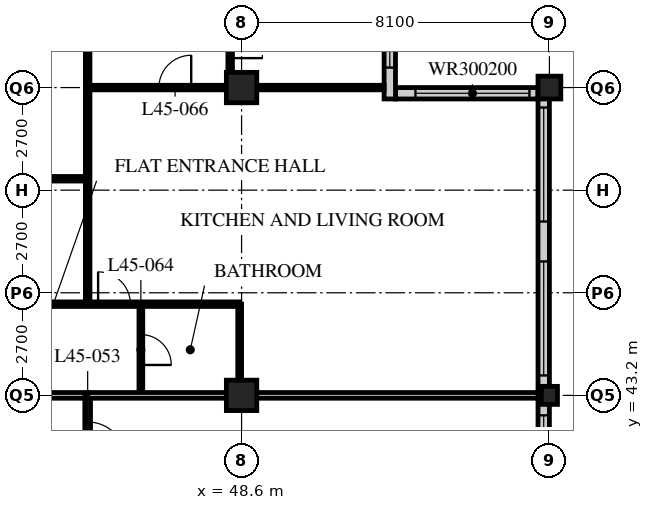
"""IFC4 building model, lengths in metres.
Left out: names, types, materials, properties, quantities, classifications, styles, units other than length and angle.
Written with IfcOpenShell. Run it as: python <this file> out.ifc"""

import sys

from ifc_helpers import new_model, si_unit, direction, frame, frame_2d, origin, origin_2d, place, context, subcontext, project, spatial, rectangle, hollow_rectangle, i_section, extrude, element, fill, save


model = new_model("IFC4")
c1 = context("Model", 3, precision=1e-05, world=origin(), true_north=direction((0.0, 1.0)))
c2 = subcontext(c1, "Body", "Model", "MODEL_VIEW")
j1 = project(units=[si_unit("LENGTHUNIT", "METRE"), si_unit("PLANEANGLEUNIT", "RADIAN")], contexts=[c1])
p1 = place(None, origin())
s1 = spatial("IfcSite", under=j1, at=p1, CompositionType="ELEMENT")
p2 = place(p1, origin())
s2 = spatial("IfcBuilding", under=s1, at=p2, CompositionType="ELEMENT")
p3 = place(p2, frame((0.0, 0.0, 177.6)))
s3 = spatial("IfcBuildingStorey", under=s2, at=p3, CompositionType="ELEMENT", Elevation=177.6)
for number, where, z_axis, x_axis in (
    (1, (48.6, 43.2, 0.0), (0.0, 0.0, 1.0), (1.0, 0.0, 0.0)),
    (2, (48.6, 51.3, 0.0), (0.0, 0.0, 1.0), (1.0, 0.0, 0.0)),
):
    element("IfcColumn", number, at=place(p3, frame(where, z_axis=z_axis, x_axis=x_axis)), inside=s3, PredefinedType="COLUMN", context=c2, shape_type="SweptSolid", body=[
        extrude(hollow_rectangle(XDim=0.8, YDim=0.8, WallThickness=0.08, at=origin_2d()), origin(), (0.0, 0.0, 1.0), 3.6),
    ])
p4 = place(p3, frame((56.7, 43.2, 0.0), z_axis=(0.0, 0.0, 1.0), x_axis=(1.0, 0.0, 0.0)))
e3 = element("IfcColumn", 3, at=p4, inside=s3, PredefinedType="COLUMN", context=c2, shape_type="SweptSolid", body=[
    extrude(i_section(OverallWidth=0.424, OverallDepth=0.475, WebThickness=0.048, FlangeThickness=0.077, FilletRadius=0.015, at=origin_2d()), origin(), (0.0, 0.0, 1.0), 3.6),
])
p5 = place(p3, frame((56.7, 51.3, 0.0), z_axis=(0.0, 0.0, 1.0), x_axis=(1.0, 0.0, 0.0)))
e4 = element("IfcColumn", 4, at=p5, inside=s3, PredefinedType="COLUMN", context=c2, shape_type="SweptSolid", body=[
    extrude(hollow_rectangle(XDim=0.6, YDim=0.6, WallThickness=0.05, at=origin_2d()), origin(), (0.0, 0.0, 1.0), 3.6),
])
p6 = place(p3, frame((56.55, 19.2, 0.0), z_axis=(0.0, 0.0, 1.0), x_axis=(0.0, 1.0, 0.0)))
e5 = element("IfcWall", 5, at=p6, inside=s3, PredefinedType="SOLIDWALL", context=c2, shape_type="SweptSolid", body=[
    extrude(rectangle(XDim=32.1, YDim=0.3, at=frame_2d((16.05, 0.0))), origin(), (0.0, 0.0, 1.0), 3.39),
])
p7 = place(p6, frame((0.225, 0.0, 0.6)))
e6 = element("IfcOpeningElement", 6, at=p7, cuts=e5, PredefinedType="OPENING", context=c2, shape_type="SweptSolid", body=[
    extrude(rectangle(XDim=3.0, YDim=2.4, at=frame_2d((1.5, 1.2))), frame((0.0, 0.16, 0.0), z_axis=(0.0, -1.0, 0.0), x_axis=(1.0, 0.0, 0.0)), (0.0, 0.0, 1.0), 0.32),
])
p8 = place(p6, frame((4.275, 0.0, 0.6)))
e7 = element("IfcOpeningElement", 7, at=p8, cuts=e5, PredefinedType="OPENING", context=c2, shape_type="SweptSolid", body=[
    extrude(rectangle(XDim=3.0, YDim=2.4, at=frame_2d((1.5, 1.2))), frame((0.0, 0.16, 0.0), z_axis=(0.0, -1.0, 0.0), x_axis=(1.0, 0.0, 0.0)), (0.0, 0.0, 1.0), 0.32),
])
p9 = place(p6, frame((8.325, 0.0, 0.6)))
e8 = element("IfcOpeningElement", 8, at=p9, cuts=e5, PredefinedType="OPENING", context=c2, shape_type="SweptSolid", body=[
    extrude(rectangle(XDim=3.0, YDim=2.4, at=frame_2d((1.5, 1.2))), frame((0.0, 0.16, 0.0), z_axis=(0.0, -1.0, 0.0), x_axis=(1.0, 0.0, 0.0)), (0.0, 0.0, 1.0), 0.32),
])
p10 = place(p6, frame((12.375, 0.0, 0.6)))
e9 = element("IfcOpeningElement", 9, at=p10, cuts=e5, PredefinedType="OPENING", context=c2, shape_type="SweptSolid", body=[
    extrude(rectangle(XDim=3.0, YDim=2.4, at=frame_2d((1.5, 1.2))), frame((0.0, 0.16, 0.0), z_axis=(0.0, -1.0, 0.0), x_axis=(1.0, 0.0, 0.0)), (0.0, 0.0, 1.0), 0.32),
])
p11 = place(p6, frame((16.425, 0.0, 0.6)))
e10 = element("IfcOpeningElement", 10, at=p11, cuts=e5, PredefinedType="OPENING", context=c2, shape_type="SweptSolid", body=[
    extrude(rectangle(XDim=3.0, YDim=2.4, at=frame_2d((1.5, 1.2))), frame((0.0, 0.16, 0.0), z_axis=(0.0, -1.0, 0.0), x_axis=(1.0, 0.0, 0.0)), (0.0, 0.0, 1.0), 0.32),
])
p12 = place(p6, frame((20.475, 0.0, 0.6)))
e11 = element("IfcOpeningElement", 11, at=p12, cuts=e5, PredefinedType="OPENING", context=c2, shape_type="SweptSolid", body=[
    extrude(rectangle(XDim=3.0, YDim=2.4, at=frame_2d((1.5, 1.2))), frame((0.0, 0.16, 0.0), z_axis=(0.0, -1.0, 0.0), x_axis=(1.0, 0.0, 0.0)), (0.0, 0.0, 1.0), 0.32),
])
p13 = place(p6, frame((24.525, 0.0, 0.6)))
e12 = element("IfcOpeningElement", 12, at=p13, cuts=e5, PredefinedType="OPENING", context=c2, shape_type="SweptSolid", body=[
    extrude(rectangle(XDim=3.0, YDim=2.4, at=frame_2d((1.5, 1.2))), frame((0.0, 0.16, 0.0), z_axis=(0.0, -1.0, 0.0), x_axis=(1.0, 0.0, 0.0)), (0.0, 0.0, 1.0), 0.32),
])
p14 = place(p6, frame((28.575, 0.0, 0.6)))
e13 = element("IfcOpeningElement", 13, at=p14, cuts=e5, PredefinedType="OPENING", context=c2, shape_type="SweptSolid", body=[
    extrude(rectangle(XDim=3.0, YDim=2.4, at=frame_2d((1.5, 1.2))), frame((0.0, 0.16, 0.0), z_axis=(0.0, -1.0, 0.0), x_axis=(1.0, 0.0, 0.0)), (0.0, 0.0, 1.0), 0.32),
])
p15 = place(p3, frame((56.4, 51.15, 0.0), z_axis=(0.0, 0.0, 1.0), x_axis=(-1.0, 0.0, 0.0)))
e14 = element("IfcWall", 14, at=p15, inside=s3, PredefinedType="SOLIDWALL", context=c2, shape_type="SweptSolid", body=[
    extrude(rectangle(XDim=3.75, YDim=0.3, at=frame_2d((1.875, 0.0))), origin(), (0.0, 0.0, 1.0), 3.39),
])
p16 = place(p15, frame((0.225, 0.0, 0.6)))
e15 = element("IfcOpeningElement", 15, at=p16, cuts=e14, PredefinedType="OPENING", context=c2, shape_type="SweptSolid", body=[
    extrude(rectangle(XDim=3.0, YDim=2.0, at=frame_2d((1.5, 1.0))), frame((0.0, 0.16, 0.0), z_axis=(0.0, -1.0, 0.0), x_axis=(1.0, 0.0, 0.0)), (0.0, 0.0, 1.0), 0.32),
])
p17 = place(p3, frame((52.5, 51.0, 0.0), z_axis=(0.0, 0.0, 1.0), x_axis=(0.0, 1.0, 0.0)))
e16 = element("IfcWall", 16, at=p17, inside=s3, PredefinedType="SOLIDWALL", context=c2, shape_type="SweptSolid", body=[
    extrude(rectangle(XDim=4.35, YDim=0.3, at=frame_2d((2.175, 0.0))), origin(), (0.0, 0.0, 1.0), 3.39),
])
p18 = place(p17, frame((0.825, 0.0, 0.6)))
e17 = element("IfcOpeningElement", 17, at=p18, cuts=e16, PredefinedType="OPENING", context=c2, shape_type="SweptSolid", body=[
    extrude(rectangle(XDim=3.0, YDim=2.0, at=frame_2d((1.5, 1.0))), frame((0.0, 0.16, 0.0), z_axis=(0.0, -1.0, 0.0), x_axis=(1.0, 0.0, 0.0)), (0.0, 0.0, 1.0), 0.32),
])
p19 = place(p3, frame((12.15, 43.2, 0.0), z_axis=(0.0, 0.0, 1.0), x_axis=(1.0, 0.0, 0.0)))
e18 = element("IfcWall", 18, at=p19, inside=s3, PredefinedType="PARTITIONING", context=c2, shape_type="SweptSolid", body=[
    extrude(rectangle(XDim=32.4, YDim=0.15, at=frame_2d((16.2, 0.0))), origin(), (0.0, 0.0, 1.0), 2.778),
])
p20 = place(p19, frame((4.95, 0.0, 0.0)))
e19 = element("IfcOpeningElement", 19, at=p20, cuts=e18, PredefinedType="OPENING", context=c2, shape_type="SweptSolid", body=[
    extrude(rectangle(XDim=1.0, YDim=2.1, at=frame_2d((0.5, 1.05))), frame((0.0, 0.085, 0.0), z_axis=(0.0, -1.0, 0.0), x_axis=(1.0, 0.0, 0.0)), (0.0, 0.0, 1.0), 0.17),
])
p21 = place(p19, frame((13.05, 0.0, 0.0)))
e20 = element("IfcOpeningElement", 20, at=p21, cuts=e18, PredefinedType="OPENING", context=c2, shape_type="SweptSolid", body=[
    extrude(rectangle(XDim=1.0, YDim=2.1, at=frame_2d((0.5, 1.05))), frame((0.0, 0.085, 0.0), z_axis=(0.0, -1.0, 0.0), x_axis=(1.0, 0.0, 0.0)), (0.0, 0.0, 1.0), 0.17),
])
p22 = place(p19, frame((21.15, 0.0, 0.0)))
e21 = element("IfcOpeningElement", 21, at=p22, cuts=e18, PredefinedType="OPENING", context=c2, shape_type="SweptSolid", body=[
    extrude(rectangle(XDim=1.0, YDim=2.1, at=frame_2d((0.5, 1.05))), frame((0.0, 0.085, 0.0), z_axis=(0.0, -1.0, 0.0), x_axis=(1.0, 0.0, 0.0)), (0.0, 0.0, 1.0), 0.17),
])
p23 = place(p19, frame((29.875, 0.0, 0.0)))
e22 = element("IfcOpeningElement", 22, at=p23, cuts=e18, PredefinedType="OPENING", context=c2, shape_type="SweptSolid", body=[
    extrude(rectangle(XDim=1.0, YDim=2.1, at=frame_2d((0.5, 1.05))), frame((0.0, 0.085, 0.0), z_axis=(0.0, -1.0, 0.0), x_axis=(1.0, 0.0, 0.0)), (0.0, 0.0, 1.0), 0.17),
])
p24 = place(p19, frame((1.525, 0.0, 0.0)))
e23 = element("IfcOpeningElement", 23, at=p24, cuts=e18, PredefinedType="OPENING", context=c2, shape_type="SweptSolid", body=[
    extrude(rectangle(XDim=1.0, YDim=2.1, at=frame_2d((0.5, 1.05))), frame((0.0, 0.085, 0.0), z_axis=(0.0, -1.0, 0.0), x_axis=(1.0, 0.0, 0.0)), (0.0, 0.0, 1.0), 0.17),
])
p25 = place(p3, frame((44.55, 18.9, 0.0), z_axis=(0.0, 0.0, 1.0), x_axis=(0.0, 1.0, 0.0)))
e24 = element("IfcWall", 24, at=p25, inside=s3, PredefinedType="PARTITIONING", context=c2, shape_type="SweptSolid", body=[
    extrude(rectangle(XDim=24.3, YDim=0.15, at=frame_2d((12.15, 0.0))), origin(), (0.0, 0.0, 1.0), 3.39),
])
p26 = place(p25, frame((2.35, 0.0, 0.0)))
e25 = element("IfcOpeningElement", 25, at=p26, cuts=e24, PredefinedType="OPENING", context=c2, shape_type="SweptSolid", body=[
    extrude(rectangle(XDim=1.0, YDim=2.1, at=frame_2d((0.5, 1.05))), frame((0.0, 0.085, 0.0), z_axis=(0.0, -1.0, 0.0), x_axis=(1.0, 0.0, 0.0)), (0.0, 0.0, 1.0), 0.17),
])
p27 = place(p25, frame((4.45, 0.0, 0.0)))
e26 = element("IfcOpeningElement", 26, at=p27, cuts=e24, PredefinedType="OPENING", context=c2, shape_type="SweptSolid", body=[
    extrude(rectangle(XDim=1.0, YDim=2.1, at=frame_2d((0.5, 1.05))), frame((0.0, 0.085, 0.0), z_axis=(0.0, -1.0, 0.0), x_axis=(1.0, 0.0, 0.0)), (0.0, 0.0, 1.0), 0.17),
])
p28 = place(p25, frame((18.55, 0.0, 0.0)))
e27 = element("IfcOpeningElement", 27, at=p28, cuts=e24, PredefinedType="OPENING", context=c2, shape_type="SweptSolid", body=[
    extrude(rectangle(XDim=1.0, YDim=2.1, at=frame_2d((0.5, 1.05))), frame((0.0, 0.085, 0.0), z_axis=(0.0, -1.0, 0.0), x_axis=(1.0, 0.0, 0.0)), (0.0, 0.0, 1.0), 0.17),
])
p29 = place(p25, frame((22.6, 0.0, 0.0)))
e28 = element("IfcOpeningElement", 28, at=p29, cuts=e24, PredefinedType="OPENING", context=c2, shape_type="SweptSolid", body=[
    extrude(rectangle(XDim=1.0, YDim=2.1, at=frame_2d((0.5, 1.05))), frame((0.0, 0.085, 0.0), z_axis=(0.0, -1.0, 0.0), x_axis=(1.0, 0.0, 0.0)), (0.0, 0.0, 1.0), 0.17),
])
p30 = place(p3, frame((45.95, 43.2, 0.0), z_axis=(0.0, 0.0, 1.0), x_axis=(0.0, 1.0, 0.0)))
e29 = element("IfcWall", 29, at=p30, inside=s3, PredefinedType="PARTITIONING", context=c2, shape_type="SweptSolid", body=[
    extrude(rectangle(XDim=2.4, YDim=0.1, at=frame_2d((1.2, 0.0))), origin(), (0.0, 0.0, 1.0), 3.39),
])
p31 = place(p30, frame((0.8, 0.0, 0.0)))
e30 = element("IfcOpeningElement", 30, at=p31, cuts=e29, PredefinedType="OPENING", context=c2, shape_type="SweptSolid", body=[
    extrude(rectangle(XDim=0.8, YDim=2.1, at=frame_2d((0.4, 1.05))), frame((0.0, 0.06, 0.0), z_axis=(0.0, -1.0, 0.0), x_axis=(1.0, 0.0, 0.0)), (0.0, 0.0, 1.0), 0.12),
])
p32 = place(p3, frame((48.55, 43.2, 0.0), z_axis=(0.0, 0.0, 1.0), x_axis=(0.0, 1.0, 0.0)))
e31 = element("IfcWall", 31, at=p32, inside=s3, PredefinedType="PARTITIONING", context=c2, shape_type="SweptSolid", body=[
    extrude(rectangle(XDim=2.4, YDim=0.1, at=frame_2d((1.2, 0.0))), origin(), (0.0, 0.0, 1.0), 2.778),
])
p33 = place(p3, frame((44.55, 45.6, 0.0), z_axis=(0.0, 0.0, 1.0), x_axis=(0.0, 1.0, 0.0)))
e32 = element("IfcWall", 32, at=p33, inside=s3, PredefinedType="PARTITIONING", context=c2, shape_type="SweptSolid", body=[
    extrude(rectangle(XDim=13.5, YDim=0.12, at=frame_2d((6.75, 0.0))), origin(), (0.0, 0.0, 1.0), 3.39),
])
p34 = place(p3, frame((44.55, 51.3, 0.0), z_axis=(0.0, 0.0, 1.0), x_axis=(1.0, 0.0, 0.0)))
e33 = element("IfcWall", 33, at=p34, inside=s3, PredefinedType="PARTITIONING", context=c2, shape_type="SweptSolid", body=[
    extrude(rectangle(XDim=7.8, YDim=0.12, at=frame_2d((3.9, 0.0))), origin(), (0.0, 0.0, 1.0), 2.778),
])
p35 = place(p34, frame((1.875, 0.0, 0.0)))
e34 = element("IfcOpeningElement", 34, at=p35, cuts=e33, PredefinedType="OPENING", context=c2, shape_type="SweptSolid", body=[
    extrude(rectangle(XDim=0.85, YDim=2.1, at=frame_2d((0.425, 1.05))), frame((0.0, 0.07, 0.0), z_axis=(0.0, -1.0, 0.0), x_axis=(1.0, 0.0, 0.0)), (0.0, 0.0, 1.0), 0.14),
])
p36 = place(p3, frame((44.55, 43.2, 0.0), z_axis=(0.0, 0.0, 1.0), x_axis=(1.0, 0.0, 0.0)))
e35 = element("IfcWall", 35, at=p36, inside=s3, PredefinedType="PARTITIONING", context=c2, shape_type="SweptSolid", body=[
    extrude(rectangle(XDim=11.85, YDim=0.15, at=frame_2d((5.925, 0.0))), origin(), (0.0, 0.0, 1.0), 2.778),
])
p37 = place(p3, frame((8.15, 45.6, 0.0), z_axis=(0.0, 0.0, 1.0), x_axis=(1.0, 0.0, 0.0)))
e36 = element("IfcWall", 36, at=p37, inside=s3, PredefinedType="PARTITIONING", context=c2, shape_type="SweptSolid", body=[
    extrude(rectangle(XDim=40.4, YDim=0.12, at=frame_2d((20.2, 0.0))), origin(), (0.0, 0.0, 1.0), 3.39),
])
p38 = place(p37, frame((9.025, 0.0, 0.0)))
e37 = element("IfcOpeningElement", 37, at=p38, cuts=e36, PredefinedType="OPENING", context=c2, shape_type="SweptSolid", body=[
    extrude(rectangle(XDim=0.85, YDim=2.1, at=frame_2d((0.425, 1.05))), frame((0.0, 0.07, 0.0), z_axis=(0.0, -1.0, 0.0), x_axis=(1.0, 0.0, 0.0)), (0.0, 0.0, 1.0), 0.14),
])
p39 = place(p37, frame((12.425, 0.0, 0.0)))
e38 = element("IfcOpeningElement", 38, at=p39, cuts=e36, PredefinedType="OPENING", context=c2, shape_type="SweptSolid", body=[
    extrude(rectangle(XDim=0.85, YDim=2.1, at=frame_2d((0.425, 1.05))), frame((0.0, 0.07, 0.0), z_axis=(0.0, -1.0, 0.0), x_axis=(1.0, 0.0, 0.0)), (0.0, 0.0, 1.0), 0.14),
])
p40 = place(p37, frame((17.125, 0.0, 0.0)))
e39 = element("IfcOpeningElement", 39, at=p40, cuts=e36, PredefinedType="OPENING", context=c2, shape_type="SweptSolid", body=[
    extrude(rectangle(XDim=0.85, YDim=2.1, at=frame_2d((0.425, 1.05))), frame((0.0, 0.07, 0.0), z_axis=(0.0, -1.0, 0.0), x_axis=(1.0, 0.0, 0.0)), (0.0, 0.0, 1.0), 0.14),
])
p41 = place(p37, frame((20.525, 0.0, 0.0)))
e40 = element("IfcOpeningElement", 40, at=p41, cuts=e36, PredefinedType="OPENING", context=c2, shape_type="SweptSolid", body=[
    extrude(rectangle(XDim=0.85, YDim=2.1, at=frame_2d((0.425, 1.05))), frame((0.0, 0.07, 0.0), z_axis=(0.0, -1.0, 0.0), x_axis=(1.0, 0.0, 0.0)), (0.0, 0.0, 1.0), 0.14),
])
p42 = place(p37, frame((25.225, 0.0, 0.0)))
e41 = element("IfcOpeningElement", 41, at=p42, cuts=e36, PredefinedType="OPENING", context=c2, shape_type="SweptSolid", body=[
    extrude(rectangle(XDim=0.85, YDim=2.1, at=frame_2d((0.425, 1.05))), frame((0.0, 0.07, 0.0), z_axis=(0.0, -1.0, 0.0), x_axis=(1.0, 0.0, 0.0)), (0.0, 0.0, 1.0), 0.14),
])
p43 = place(p37, frame((28.625, 0.0, 0.0)))
e42 = element("IfcOpeningElement", 42, at=p43, cuts=e36, PredefinedType="OPENING", context=c2, shape_type="SweptSolid", body=[
    extrude(rectangle(XDim=0.85, YDim=2.1, at=frame_2d((0.425, 1.05))), frame((0.0, 0.07, 0.0), z_axis=(0.0, -1.0, 0.0), x_axis=(1.0, 0.0, 0.0)), (0.0, 0.0, 1.0), 0.14),
])
p44 = place(p37, frame((32.825, 0.0, 0.0)))
e43 = element("IfcOpeningElement", 43, at=p44, cuts=e36, PredefinedType="OPENING", context=c2, shape_type="SweptSolid", body=[
    extrude(rectangle(XDim=0.85, YDim=2.1, at=frame_2d((0.425, 1.05))), frame((0.0, 0.07, 0.0), z_axis=(0.0, -1.0, 0.0), x_axis=(1.0, 0.0, 0.0)), (0.0, 0.0, 1.0), 0.14),
])
p45 = place(p37, frame((36.675, 0.0, 0.0)))
e44 = element("IfcOpeningElement", 44, at=p45, cuts=e36, PredefinedType="OPENING", context=c2, shape_type="SweptSolid", body=[
    extrude(rectangle(XDim=0.85, YDim=2.1, at=frame_2d((0.425, 1.05))), frame((0.0, 0.07, 0.0), z_axis=(0.0, -1.0, 0.0), x_axis=(1.0, 0.0, 0.0)), (0.0, 0.0, 1.0), 0.14),
])
p46 = place(p37, frame((6.725, 0.0, 0.0)))
e45 = element("IfcOpeningElement", 45, at=p46, cuts=e36, PredefinedType="OPENING", context=c2, shape_type="SweptSolid", body=[
    extrude(rectangle(XDim=0.85, YDim=2.1, at=frame_2d((0.425, 1.05))), frame((0.0, 0.07, 0.0), z_axis=(0.0, -1.0, 0.0), x_axis=(1.0, 0.0, 0.0)), (0.0, 0.0, 1.0), 0.14),
])
p47 = place(p37, frame((2.875, 0.0, 0.0)))
e46 = element("IfcOpeningElement", 46, at=p47, cuts=e36, PredefinedType="OPENING", context=c2, shape_type="SweptSolid", body=[
    extrude(rectangle(XDim=0.85, YDim=2.1, at=frame_2d((0.425, 1.05))), frame((0.0, 0.07, 0.0), z_axis=(0.0, -1.0, 0.0), x_axis=(1.0, 0.0, 0.0)), (0.0, 0.0, 1.0), 0.14),
])
p48 = place(p3, frame((48.3, 51.3, 0.0), z_axis=(0.0, 0.0, 1.0), x_axis=(0.0, 1.0, 0.0)))
e47 = element("IfcWall", 47, at=p48, inside=s3, PredefinedType="PARTITIONING", context=c2, shape_type="SweptSolid", body=[
    extrude(rectangle(XDim=3.75, YDim=0.12, at=frame_2d((1.875, 0.0))), origin(), (0.0, 0.0, 1.0), 3.39),
])
p49 = place(p48, frame((0.775, 0.0, 0.0)))
e48 = element("IfcOpeningElement", 48, at=p49, cuts=e47, PredefinedType="OPENING", context=c2, shape_type="SweptSolid", body=[
    extrude(rectangle(XDim=0.85, YDim=2.1, at=frame_2d((0.425, 1.05))), frame((0.0, 0.07, 0.0), z_axis=(0.0, -1.0, 0.0), x_axis=(1.0, 0.0, 0.0)), (0.0, 0.0, 1.0), 0.14),
])
p50 = place(p3, frame((36.45, 48.9, 0.0), z_axis=(0.0, 0.0, 1.0), x_axis=(1.0, 0.0, 0.0)))
e49 = element("IfcWall", 49, at=p50, inside=s3, PredefinedType="PARTITIONING", context=c2, shape_type="SweptSolid", body=[
    extrude(rectangle(XDim=8.1, YDim=0.12, at=frame_2d((4.05, 0.0))), origin(), (0.0, 0.0, 1.0), 3.39),
])
p51 = place(p50, frame((1.6, 0.0, 0.0)))
e50 = element("IfcOpeningElement", 50, at=p51, cuts=e49, PredefinedType="OPENING", context=c2, shape_type="SweptSolid", body=[
    extrude(rectangle(XDim=0.85, YDim=2.1, at=frame_2d((0.425, 1.05))), frame((0.0, 0.07, 0.0), z_axis=(0.0, -1.0, 0.0), x_axis=(1.0, 0.0, 0.0)), (0.0, 0.0, 1.0), 0.14),
])
p52 = place(p50, frame((5.65, 0.0, 0.0)))
e51 = element("IfcOpeningElement", 51, at=p52, cuts=e49, PredefinedType="OPENING", context=c2, shape_type="SweptSolid", body=[
    extrude(rectangle(XDim=0.85, YDim=2.1, at=frame_2d((0.425, 1.05))), frame((0.0, 0.07, 0.0), z_axis=(0.0, -1.0, 0.0), x_axis=(1.0, 0.0, 0.0)), (0.0, 0.0, 1.0), 0.14),
])
p53 = place(p12, origin())
e52 = element("IfcWindow", 52, at=p53, inside=s3, PartitioningType="SINGLE_PANEL", PredefinedType="WINDOW", context=c2, shape_type="SweptSolid", body=[
    extrude(rectangle(XDim=3.0, YDim=2.4, at=frame_2d((1.5, 1.2))), frame((0.0, 0.03, 0.0), z_axis=(0.0, -1.0, 0.0), x_axis=(1.0, 0.0, 0.0)), (0.0, 0.0, 1.0), 0.06),
])
fill(e11, e52)
p54 = place(p13, origin())
e53 = element("IfcWindow", 53, at=p54, inside=s3, PartitioningType="SINGLE_PANEL", PredefinedType="WINDOW", context=c2, shape_type="SweptSolid", body=[
    extrude(rectangle(XDim=3.0, YDim=2.4, at=frame_2d((1.5, 1.2))), frame((0.0, 0.03, 0.0), z_axis=(0.0, -1.0, 0.0), x_axis=(1.0, 0.0, 0.0)), (0.0, 0.0, 1.0), 0.06),
])
fill(e12, e53)
p55 = place(p14, origin())
e54 = element("IfcWindow", 54, at=p55, inside=s3, PartitioningType="SINGLE_PANEL", PredefinedType="WINDOW", context=c2, shape_type="SweptSolid", body=[
    extrude(rectangle(XDim=3.0, YDim=2.4, at=frame_2d((1.5, 1.2))), frame((0.0, 0.03, 0.0), z_axis=(0.0, -1.0, 0.0), x_axis=(1.0, 0.0, 0.0)), (0.0, 0.0, 1.0), 0.06),
])
fill(e13, e54)
p56 = place(p16, origin())
e55 = element("IfcWindow", 55, at=p56, inside=s3, PartitioningType="SINGLE_PANEL", PredefinedType="WINDOW", context=c2, shape_type="SweptSolid", body=[
    extrude(rectangle(XDim=3.0, YDim=2.0, at=frame_2d((1.5, 1.0))), frame((0.0, 0.03, 0.0), z_axis=(0.0, -1.0, 0.0), x_axis=(1.0, 0.0, 0.0)), (0.0, 0.0, 1.0), 0.06),
])
fill(e15, e55)
p57 = place(p18, origin())
e56 = element("IfcWindow", 56, at=p57, inside=s3, PartitioningType="SINGLE_PANEL", PredefinedType="WINDOW", context=c2, shape_type="SweptSolid", body=[
    extrude(rectangle(XDim=3.0, YDim=2.0, at=frame_2d((1.5, 1.0))), frame((0.0, 0.03, 0.0), z_axis=(0.0, -1.0, 0.0), x_axis=(1.0, 0.0, 0.0)), (0.0, 0.0, 1.0), 0.06),
])
fill(e17, e56)
p58 = place(p29, origin())
e57 = element("IfcDoor", 57, at=p58, inside=s3, OperationType="SINGLE_SWING_RIGHT", PredefinedType="DOOR", context=c2, shape_type="SweptSolid", body=[
    extrude(rectangle(XDim=1.0, YDim=2.1, at=frame_2d((0.5, 1.05))), frame((0.0, 0.025, 0.0), z_axis=(0.0, -1.0, 0.0), x_axis=(1.0, 0.0, 0.0)), (0.0, 0.0, 1.0), 0.05),
])
fill(e28, e57)
p59 = place(p31, origin())
e58 = element("IfcDoor", 58, at=p59, inside=s3, OperationType="SINGLE_SWING_RIGHT", PredefinedType="DOOR", context=c2, shape_type="SweptSolid", body=[
    extrude(rectangle(XDim=0.8, YDim=2.1, at=frame_2d((0.4, 1.05))), frame((0.0, 0.025, 0.0), z_axis=(0.0, -1.0, 0.0), x_axis=(1.0, 0.0, 0.0)), (0.0, 0.0, 1.0), 0.05),
])
fill(e30, e58)
p60 = place(p45, origin())
e59 = element("IfcDoor", 59, at=p60, inside=s3, OperationType="SINGLE_SWING_LEFT", PredefinedType="DOOR", context=c2, shape_type="SweptSolid", body=[
    extrude(rectangle(XDim=0.85, YDim=2.1, at=frame_2d((0.425, 1.05))), frame((0.0, 0.025, 0.0), z_axis=(0.0, -1.0, 0.0), x_axis=(1.0, 0.0, 0.0)), (0.0, 0.0, 1.0), 0.05),
])
fill(e44, e59)
p61 = place(p35, origin())
e60 = element("IfcDoor", 60, at=p61, inside=s3, OperationType="SINGLE_SWING_RIGHT", PredefinedType="DOOR", context=c2, shape_type="SweptSolid", body=[
    extrude(rectangle(XDim=0.85, YDim=2.1, at=frame_2d((0.425, 1.05))), frame((0.0, 0.025, 0.0), z_axis=(0.0, -1.0, 0.0), x_axis=(1.0, 0.0, 0.0)), (0.0, 0.0, 1.0), 0.05),
])
fill(e34, e60)
p62 = place(p49, origin())
e61 = element("IfcDoor", 61, at=p62, inside=s3, OperationType="SINGLE_SWING_RIGHT", PredefinedType="DOOR", context=c2, shape_type="SweptSolid", body=[
    extrude(rectangle(XDim=0.85, YDim=2.1, at=frame_2d((0.425, 1.05))), frame((0.0, 0.025, 0.0), z_axis=(0.0, -1.0, 0.0), x_axis=(1.0, 0.0, 0.0)), (0.0, 0.0, 1.0), 0.05),
])
fill(e48, e61)
save(model, sys.argv[1])
